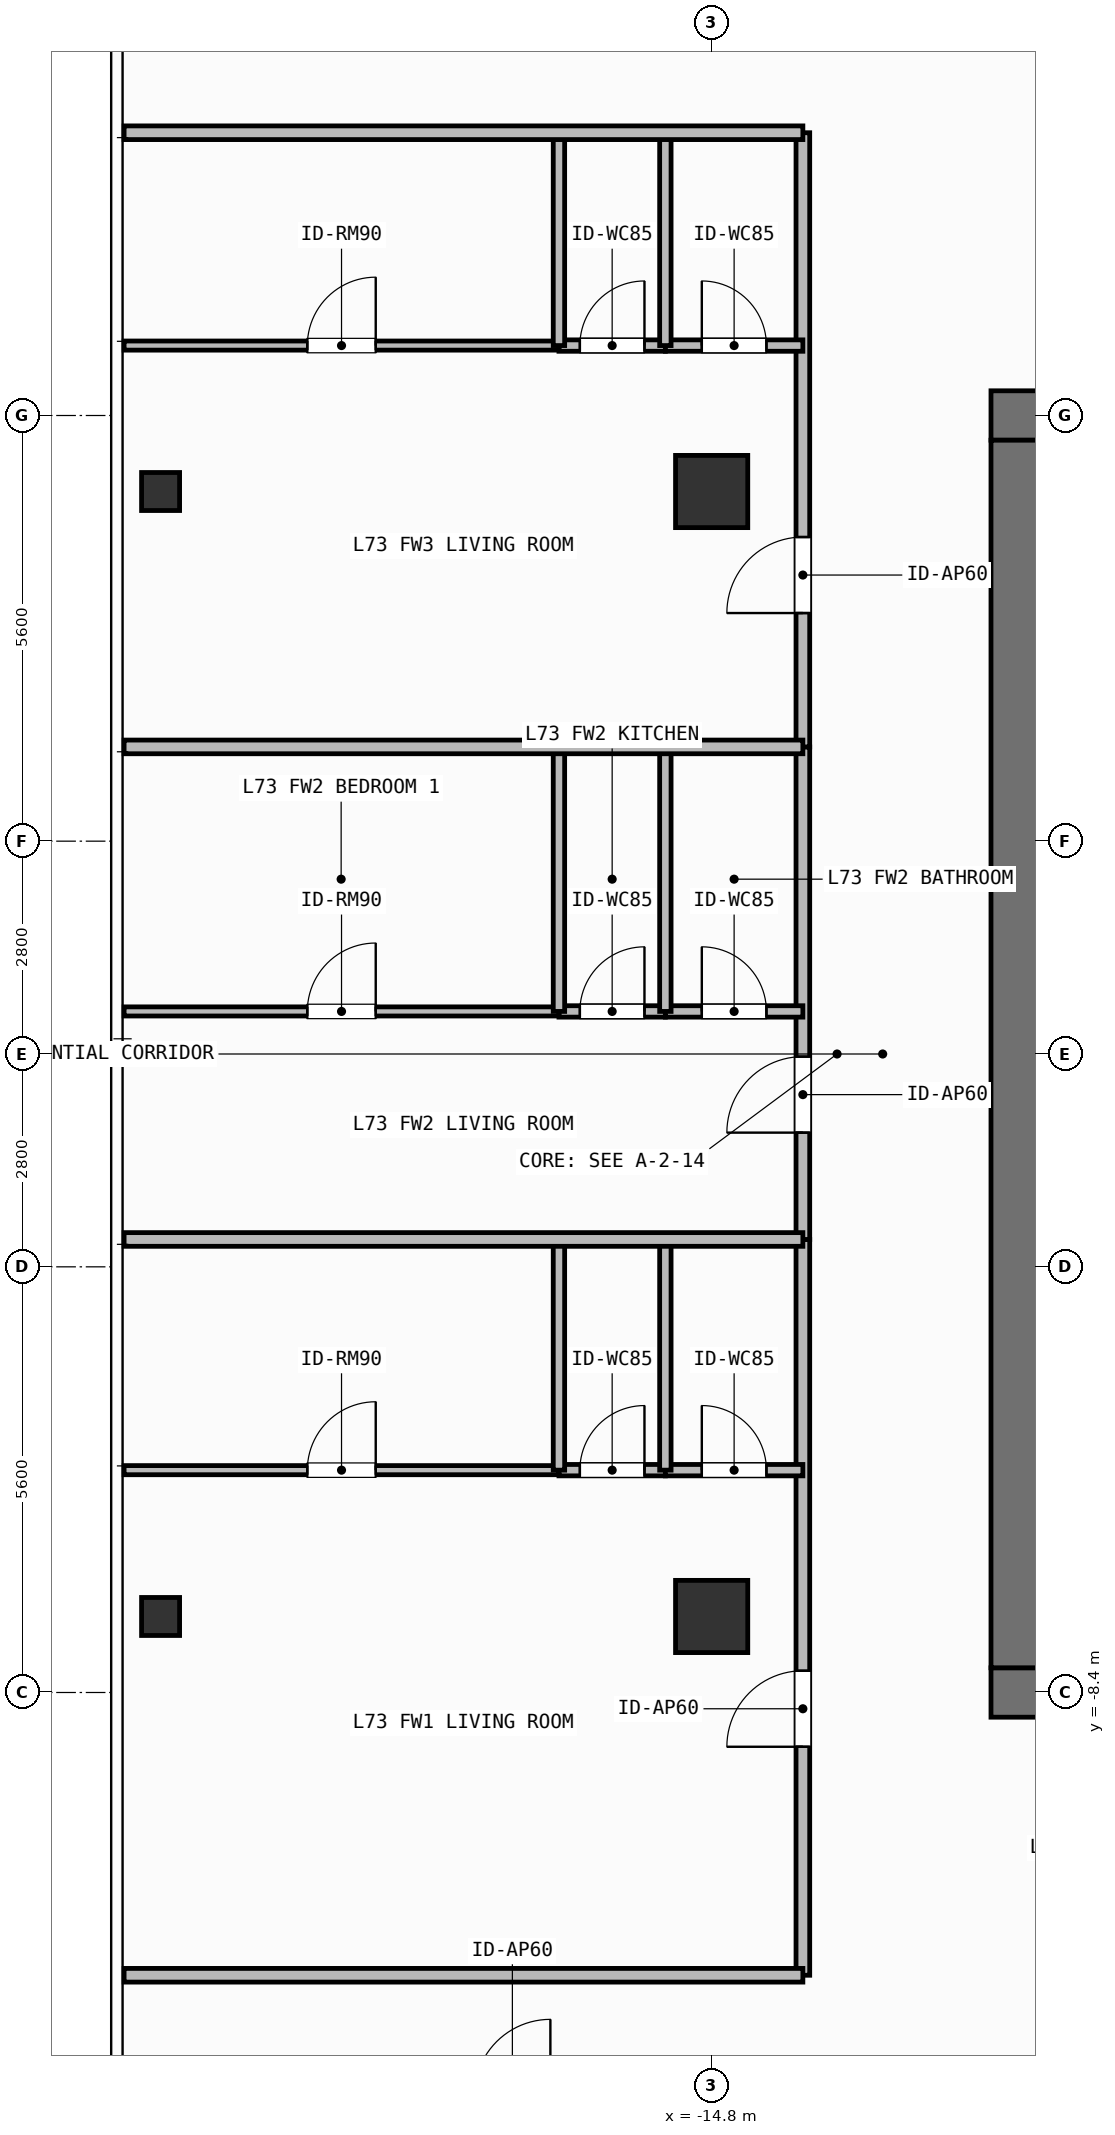
"""IFC4 building model, lengths in metres.
Left out: names, types, materials, properties, quantities, classifications, styles, units other than length and angle.
Written with IfcOpenShell. Run it as: python <this file> out.ifc"""

import sys

from ifc_helpers import new_model, si_unit, direction, frame, frame_2d, origin, origin_2d, place, context, subcontext, project, spatial, rectangle, hollow_rectangle, extrude, element, fill, save


model = new_model("IFC4")
c1 = context("Model", 3, precision=1e-05, world=origin(), true_north=direction((0.0, 1.0)))
c2 = subcontext(c1, "Body", "Model", "MODEL_VIEW")
j1 = project(units=[si_unit("LENGTHUNIT", "METRE"), si_unit("PLANEANGLEUNIT", "RADIAN")], contexts=[c1])
p1 = place(None, origin())
s1 = spatial("IfcSite", under=j1, at=p1, CompositionType="ELEMENT")
p2 = place(p1, origin())
s2 = spatial("IfcBuilding", under=s1, at=p2, CompositionType="ELEMENT")
p3 = place(p2, frame((0.0, 0.0, 297.6)))
s3 = spatial("IfcBuildingStorey", under=s2, at=p3, CompositionType="ELEMENT", Elevation=297.6)
for number, where, z_axis, x_axis in (
    (1, (-11.125, -8.4, 0.0), (0.0, 0.0, 1.0), (1.0, 0.0, 0.0)),
    (2, (-11.125, 8.4, 0.0), (0.0, 0.0, 1.0), (1.0, 0.0, 0.0)),
):
    element("IfcWall", number, at=place(p3, frame(where, z_axis=z_axis, x_axis=x_axis)), inside=s3, PredefinedType="SHEAR", context=c2, shape_type="SweptSolid", body=[
        extrude(rectangle(XDim=1.425, YDim=0.65, at=frame_2d((0.712, 0.0))), origin(), (0.0, 0.0, 1.0), 3.9),
    ])
p4 = place(p3, frame((-10.8, -8.075, 0.0), z_axis=(0.0, 0.0, 1.0), x_axis=(0.0, 1.0, 0.0)))
e3 = element("IfcWall", 3, at=p4, inside=s3, PredefinedType="SHEAR", context=c2, shape_type="SweptSolid", body=[
    extrude(rectangle(XDim=16.15, YDim=0.65, at=frame_2d((8.075, 0.0))), origin(), (0.0, 0.0, 1.0), 3.9),
])
for number, where, z_axis, x_axis in (
    (4, (-14.8, -7.4, 0.0), (0.0, 0.0, 1.0), (1.0, 0.0, 0.0)),
    (5, (-14.8, 7.4, 0.0), (0.0, 0.0, 1.0), (1.0, 0.0, 0.0)),
):
    element("IfcColumn", number, at=place(p3, frame(where, z_axis=z_axis, x_axis=x_axis)), inside=s3, PredefinedType="COLUMN", context=c2, shape_type="SweptSolid", body=[
        extrude(rectangle(XDim=0.95, YDim=0.95, at=origin_2d()), origin(), (0.0, 0.0, 1.0), 3.9),
    ])
for number, where, z_axis, x_axis in (
    (6, (-22.05, -7.4, 0.0), (0.0, 0.0, 1.0), (1.0, 0.0, 0.0)),
    (7, (-22.05, 7.4, 0.0), (0.0, 0.0, 1.0), (1.0, 0.0, 0.0)),
):
    element("IfcColumn", number, at=place(p3, frame(where, z_axis=z_axis, x_axis=x_axis)), inside=s3, PredefinedType="COLUMN", context=c2, shape_type="SweptSolid", body=[
        extrude(hollow_rectangle(XDim=0.5, YDim=0.5, WallThickness=0.025, at=origin_2d()), origin(), (0.0, 0.0, 1.0), 3.9),
    ])
p5 = place(p3, frame((-13.6, -12.12, 0.0), z_axis=(0.0, 0.0, 1.0), x_axis=(0.0, 1.0, 0.0)))
e8 = element("IfcWall", 8, at=p5, inside=s3, PredefinedType="PARTITIONING", context=c2, shape_type="SweptSolid", body=[
    extrude(rectangle(XDim=9.68, YDim=0.18, at=frame_2d((4.84, 0.0))), origin(), (0.0, 0.0, 1.0), 3.68),
])
p6 = place(p5, frame((3.006, 0.0, 0.0)))
e9 = element("IfcOpeningElement", 9, at=p6, cuts=e8, PredefinedType="OPENING", context=c2, shape_type="SweptSolid", body=[
    extrude(rectangle(XDim=1.0, YDim=2.2, at=frame_2d((0.5, 1.1))), frame((0.0, 0.1, 0.0), z_axis=(0.0, -1.0, 0.0), x_axis=(1.0, 0.0, 0.0)), (0.0, 0.0, 1.0), 0.2),
])
p7 = place(p3, frame((-16.809, -5.475, 0.0), z_axis=(0.0, 0.0, 1.0), x_axis=(1.0, 0.0, 0.0)))
e10 = element("IfcWall", 10, at=p7, inside=s3, PredefinedType="PARTITIONING", context=c2, shape_type="SweptSolid", body=[
    extrude(rectangle(XDim=1.4, YDim=0.15, at=frame_2d((0.7, 0.0))), origin(), (0.0, 0.0, 1.0), 3.68),
])
p8 = place(p7, frame((0.275, 0.0, 0.0)))
e11 = element("IfcOpeningElement", 11, at=p8, cuts=e10, PredefinedType="OPENING", context=c2, shape_type="SweptSolid", body=[
    extrude(rectangle(XDim=0.85, YDim=2.1, at=frame_2d((0.425, 1.05))), frame((0.0, 0.085, 0.0), z_axis=(0.0, -1.0, 0.0), x_axis=(1.0, 0.0, 0.0)), (0.0, 0.0, 1.0), 0.17),
])
p9 = place(p3, frame((-15.409, -5.475, 0.0), z_axis=(0.0, 0.0, 1.0), x_axis=(1.0, 0.0, 0.0)))
e12 = element("IfcWall", 12, at=p9, inside=s3, PredefinedType="PARTITIONING", context=c2, shape_type="SweptSolid", body=[
    extrude(rectangle(XDim=1.809, YDim=0.15, at=frame_2d((0.904, 0.0))), origin(), (0.0, 0.0, 1.0), 3.68),
])
p10 = place(p9, frame((0.479, 0.0, 0.0)))
e13 = element("IfcOpeningElement", 13, at=p10, cuts=e12, PredefinedType="OPENING", context=c2, shape_type="SweptSolid", body=[
    extrude(rectangle(XDim=0.85, YDim=2.1, at=frame_2d((0.425, 1.05))), frame((0.0, 0.085, 0.0), z_axis=(0.0, -1.0, 0.0), x_axis=(1.0, 0.0, 0.0)), (0.0, 0.0, 1.0), 0.17),
])
p11 = place(p3, frame((-22.53, -5.475, 0.0), z_axis=(0.0, 0.0, 1.0), x_axis=(1.0, 0.0, 0.0)))
e14 = element("IfcWall", 14, at=p11, inside=s3, PredefinedType="PARTITIONING", context=c2, shape_type="SweptSolid", body=[
    extrude(rectangle(XDim=5.721, YDim=0.12, at=frame_2d((2.86, 0.0))), origin(), (0.0, 0.0, 1.0), 3.68),
])
p12 = place(p11, frame((2.41, 0.0, 0.0)))
e15 = element("IfcOpeningElement", 15, at=p12, cuts=e14, PredefinedType="OPENING", context=c2, shape_type="SweptSolid", body=[
    extrude(rectangle(XDim=0.9, YDim=2.1, at=frame_2d((0.45, 1.05))), frame((0.0, 0.07, 0.0), z_axis=(0.0, -1.0, 0.0), x_axis=(1.0, 0.0, 0.0)), (0.0, 0.0, 1.0), 0.14),
])
p13 = place(p3, frame((-13.6, -2.44, 0.0), z_axis=(0.0, 0.0, 1.0), x_axis=(0.0, 1.0, 0.0)))
e16 = element("IfcWall", 16, at=p13, inside=s3, PredefinedType="PARTITIONING", context=c2, shape_type="SweptSolid", body=[
    extrude(rectangle(XDim=6.48, YDim=0.18, at=frame_2d((3.24, 0.0))), origin(), (0.0, 0.0, 1.0), 3.68),
])
p14 = place(p13, frame((1.406, 0.0, 0.0)))
e17 = element("IfcOpeningElement", 17, at=p14, cuts=e16, PredefinedType="OPENING", context=c2, shape_type="SweptSolid", body=[
    extrude(rectangle(XDim=1.0, YDim=2.2, at=frame_2d((0.5, 1.1))), frame((0.0, 0.1, 0.0), z_axis=(0.0, -1.0, 0.0), x_axis=(1.0, 0.0, 0.0)), (0.0, 0.0, 1.0), 0.2),
])
p15 = place(p3, frame((-16.809, 0.56, 0.0), z_axis=(0.0, 0.0, 1.0), x_axis=(1.0, 0.0, 0.0)))
e18 = element("IfcWall", 18, at=p15, inside=s3, PredefinedType="PARTITIONING", context=c2, shape_type="SweptSolid", body=[
    extrude(rectangle(XDim=1.4, YDim=0.15, at=frame_2d((0.7, 0.0))), origin(), (0.0, 0.0, 1.0), 3.68),
])
p16 = place(p15, frame((0.275, 0.0, 0.0)))
e19 = element("IfcOpeningElement", 19, at=p16, cuts=e18, PredefinedType="OPENING", context=c2, shape_type="SweptSolid", body=[
    extrude(rectangle(XDim=0.85, YDim=2.1, at=frame_2d((0.425, 1.05))), frame((0.0, 0.085, 0.0), z_axis=(0.0, -1.0, 0.0), x_axis=(1.0, 0.0, 0.0)), (0.0, 0.0, 1.0), 0.17),
])
p17 = place(p3, frame((-15.409, 0.56, 0.0), z_axis=(0.0, 0.0, 1.0), x_axis=(1.0, 0.0, 0.0)))
e20 = element("IfcWall", 20, at=p17, inside=s3, PredefinedType="PARTITIONING", context=c2, shape_type="SweptSolid", body=[
    extrude(rectangle(XDim=1.809, YDim=0.15, at=frame_2d((0.904, 0.0))), origin(), (0.0, 0.0, 1.0), 3.68),
])
p18 = place(p17, frame((0.479, 0.0, 0.0)))
e21 = element("IfcOpeningElement", 21, at=p18, cuts=e20, PredefinedType="OPENING", context=c2, shape_type="SweptSolid", body=[
    extrude(rectangle(XDim=0.85, YDim=2.1, at=frame_2d((0.425, 1.05))), frame((0.0, 0.085, 0.0), z_axis=(0.0, -1.0, 0.0), x_axis=(1.0, 0.0, 0.0)), (0.0, 0.0, 1.0), 0.17),
])
p19 = place(p3, frame((-22.53, 0.56, 0.0), z_axis=(0.0, 0.0, 1.0), x_axis=(1.0, 0.0, 0.0)))
e22 = element("IfcWall", 22, at=p19, inside=s3, PredefinedType="PARTITIONING", context=c2, shape_type="SweptSolid", body=[
    extrude(rectangle(XDim=5.721, YDim=0.12, at=frame_2d((2.86, 0.0))), origin(), (0.0, 0.0, 1.0), 3.68),
])
p20 = place(p19, frame((2.41, 0.0, 0.0)))
e23 = element("IfcOpeningElement", 23, at=p20, cuts=e22, PredefinedType="OPENING", context=c2, shape_type="SweptSolid", body=[
    extrude(rectangle(XDim=0.9, YDim=2.1, at=frame_2d((0.45, 1.05))), frame((0.0, 0.07, 0.0), z_axis=(0.0, -1.0, 0.0), x_axis=(1.0, 0.0, 0.0)), (0.0, 0.0, 1.0), 0.14),
])
p21 = place(p3, frame((-13.6, 4.04, 0.0), z_axis=(0.0, 0.0, 1.0), x_axis=(0.0, 1.0, 0.0)))
e24 = element("IfcWall", 24, at=p21, inside=s3, PredefinedType="PARTITIONING", context=c2, shape_type="SweptSolid", body=[
    extrude(rectangle(XDim=8.08, YDim=0.18, at=frame_2d((4.04, 0.0))), origin(), (0.0, 0.0, 1.0), 3.68),
])
p22 = place(p21, frame((1.761, 0.0, 0.0)))
e25 = element("IfcOpeningElement", 25, at=p22, cuts=e24, PredefinedType="OPENING", context=c2, shape_type="SweptSolid", body=[
    extrude(rectangle(XDim=1.0, YDim=2.2, at=frame_2d((0.5, 1.1))), frame((0.0, 0.1, 0.0), z_axis=(0.0, -1.0, 0.0), x_axis=(1.0, 0.0, 0.0)), (0.0, 0.0, 1.0), 0.2),
])
p23 = place(p3, frame((-16.809, 9.32, 0.0), z_axis=(0.0, 0.0, 1.0), x_axis=(1.0, 0.0, 0.0)))
e26 = element("IfcWall", 26, at=p23, inside=s3, PredefinedType="PARTITIONING", context=c2, shape_type="SweptSolid", body=[
    extrude(rectangle(XDim=1.4, YDim=0.15, at=frame_2d((0.7, 0.0))), origin(), (0.0, 0.0, 1.0), 3.68),
])
p24 = place(p23, frame((0.275, 0.0, 0.0)))
e27 = element("IfcOpeningElement", 27, at=p24, cuts=e26, PredefinedType="OPENING", context=c2, shape_type="SweptSolid", body=[
    extrude(rectangle(XDim=0.85, YDim=2.1, at=frame_2d((0.425, 1.05))), frame((0.0, 0.085, 0.0), z_axis=(0.0, -1.0, 0.0), x_axis=(1.0, 0.0, 0.0)), (0.0, 0.0, 1.0), 0.17),
])
p25 = place(p3, frame((-15.409, 9.32, 0.0), z_axis=(0.0, 0.0, 1.0), x_axis=(1.0, 0.0, 0.0)))
e28 = element("IfcWall", 28, at=p25, inside=s3, PredefinedType="PARTITIONING", context=c2, shape_type="SweptSolid", body=[
    extrude(rectangle(XDim=1.809, YDim=0.15, at=frame_2d((0.904, 0.0))), origin(), (0.0, 0.0, 1.0), 3.68),
])
p26 = place(p25, frame((0.479, 0.0, 0.0)))
e29 = element("IfcOpeningElement", 29, at=p26, cuts=e28, PredefinedType="OPENING", context=c2, shape_type="SweptSolid", body=[
    extrude(rectangle(XDim=0.85, YDim=2.1, at=frame_2d((0.425, 1.05))), frame((0.0, 0.085, 0.0), z_axis=(0.0, -1.0, 0.0), x_axis=(1.0, 0.0, 0.0)), (0.0, 0.0, 1.0), 0.17),
])
p27 = place(p3, frame((-22.53, 9.32, 0.0), z_axis=(0.0, 0.0, 1.0), x_axis=(1.0, 0.0, 0.0)))
e30 = element("IfcWall", 30, at=p27, inside=s3, PredefinedType="PARTITIONING", context=c2, shape_type="SweptSolid", body=[
    extrude(rectangle(XDim=5.721, YDim=0.12, at=frame_2d((2.86, 0.0))), origin(), (0.0, 0.0, 1.0), 3.68),
])
p28 = place(p27, frame((2.41, 0.0, 0.0)))
e31 = element("IfcOpeningElement", 31, at=p28, cuts=e30, PredefinedType="OPENING", context=c2, shape_type="SweptSolid", body=[
    extrude(rectangle(XDim=0.9, YDim=2.1, at=frame_2d((0.45, 1.05))), frame((0.0, 0.07, 0.0), z_axis=(0.0, -1.0, 0.0), x_axis=(1.0, 0.0, 0.0)), (0.0, 0.0, 1.0), 0.14),
])
for number, where, z_axis, x_axis in (
    (32, (-15.409, -5.475, 0.0), (0.0, 0.0, 1.0), (0.0, 1.0, 0.0)),
    (33, (-16.809, -5.475, 0.0), (0.0, 0.0, 1.0), (0.0, 1.0, 0.0)),
):
    element("IfcWall", number, at=place(p3, frame(where, z_axis=z_axis, x_axis=x_axis)), inside=s3, PredefinedType="PARTITIONING", context=c2, shape_type="SweptSolid", body=[
        extrude(rectangle(XDim=3.035, YDim=0.15, at=frame_2d((1.518, 0.0))), origin(), (0.0, 0.0, 1.0), 3.68),
    ])
for number, where, z_axis, x_axis in (
    (34, (-15.409, 0.56, 0.0), (0.0, 0.0, 1.0), (0.0, 1.0, 0.0)),
    (35, (-16.809, 0.56, 0.0), (0.0, 0.0, 1.0), (0.0, 1.0, 0.0)),
):
    element("IfcWall", number, at=place(p3, frame(where, z_axis=z_axis, x_axis=x_axis)), inside=s3, PredefinedType="PARTITIONING", context=c2, shape_type="SweptSolid", body=[
        extrude(rectangle(XDim=3.48, YDim=0.15, at=frame_2d((1.74, 0.0))), origin(), (0.0, 0.0, 1.0), 3.68),
    ])
p29 = place(p3, frame((-22.53, -2.44, 0.0), z_axis=(0.0, 0.0, 1.0), x_axis=(1.0, 0.0, 0.0)))
e36 = element("IfcWall", 36, at=p29, inside=s3, PredefinedType="PARTITIONING", context=c2, shape_type="SweptSolid", body=[
    extrude(rectangle(XDim=8.93, YDim=0.18, at=frame_2d((4.465, 0.0))), origin(), (0.0, 0.0, 1.0), 3.68),
])
for number, where, z_axis, x_axis in (
    (37, (-15.409, 9.32, 0.0), (0.0, 0.0, 1.0), (0.0, 1.0, 0.0)),
    (38, (-16.809, 9.32, 0.0), (0.0, 0.0, 1.0), (0.0, 1.0, 0.0)),
):
    element("IfcWall", number, at=place(p3, frame(where, z_axis=z_axis, x_axis=x_axis)), inside=s3, PredefinedType="PARTITIONING", context=c2, shape_type="SweptSolid", body=[
        extrude(rectangle(XDim=2.8, YDim=0.15, at=frame_2d((1.4, 0.0))), origin(), (0.0, 0.0, 1.0), 3.68),
    ])
for number, where, z_axis, x_axis in (
    (39, (-22.53, 4.04, 0.0), (0.0, 0.0, 1.0), (1.0, 0.0, 0.0)),
    (40, (-22.53, -12.12, 0.0), (0.0, 0.0, 1.0), (1.0, 0.0, 0.0)),
    (41, (-22.53, 12.12, 0.0), (0.0, 0.0, 1.0), (1.0, 0.0, 0.0)),
):
    element("IfcWall", number, at=place(p3, frame(where, z_axis=z_axis, x_axis=x_axis)), inside=s3, PredefinedType="PARTITIONING", context=c2, shape_type="SweptSolid", body=[
        extrude(rectangle(XDim=8.93, YDim=0.18, at=frame_2d((4.465, 0.0))), origin(), (0.0, 0.0, 1.0), 3.68),
    ])
p30 = place(p6, origin())
e42 = element("IfcDoor", 42, at=p30, inside=s3, OperationType="SINGLE_SWING_LEFT", PredefinedType="DOOR", context=c2, shape_type="SweptSolid", body=[
    extrude(rectangle(XDim=1.0, YDim=2.2, at=frame_2d((0.5, 1.1))), frame((0.0, 0.025, 0.0), z_axis=(0.0, -1.0, 0.0), x_axis=(1.0, 0.0, 0.0)), (0.0, 0.0, 1.0), 0.05),
])
fill(e9, e42)
p31 = place(p8, origin())
e43 = element("IfcDoor", 43, at=p31, inside=s3, OperationType="SINGLE_SWING_RIGHT", PredefinedType="DOOR", context=c2, shape_type="SweptSolid", body=[
    extrude(rectangle(XDim=0.85, YDim=2.1, at=frame_2d((0.425, 1.05))), frame((0.0, 0.025, 0.0), z_axis=(0.0, -1.0, 0.0), x_axis=(1.0, 0.0, 0.0)), (0.0, 0.0, 1.0), 0.05),
])
fill(e11, e43)
p32 = place(p10, origin())
e44 = element("IfcDoor", 44, at=p32, inside=s3, OperationType="SINGLE_SWING_LEFT", PredefinedType="DOOR", context=c2, shape_type="SweptSolid", body=[
    extrude(rectangle(XDim=0.85, YDim=2.1, at=frame_2d((0.425, 1.05))), frame((0.0, 0.025, 0.0), z_axis=(0.0, -1.0, 0.0), x_axis=(1.0, 0.0, 0.0)), (0.0, 0.0, 1.0), 0.05),
])
fill(e13, e44)
p33 = place(p12, origin())
e45 = element("IfcDoor", 45, at=p33, inside=s3, OperationType="SINGLE_SWING_RIGHT", PredefinedType="DOOR", context=c2, shape_type="SweptSolid", body=[
    extrude(rectangle(XDim=0.9, YDim=2.1, at=frame_2d((0.45, 1.05))), frame((0.0, 0.025, 0.0), z_axis=(0.0, -1.0, 0.0), x_axis=(1.0, 0.0, 0.0)), (0.0, 0.0, 1.0), 0.05),
])
fill(e15, e45)
p34 = place(p14, origin())
e46 = element("IfcDoor", 46, at=p34, inside=s3, OperationType="SINGLE_SWING_LEFT", PredefinedType="DOOR", context=c2, shape_type="SweptSolid", body=[
    extrude(rectangle(XDim=1.0, YDim=2.2, at=frame_2d((0.5, 1.1))), frame((0.0, 0.025, 0.0), z_axis=(0.0, -1.0, 0.0), x_axis=(1.0, 0.0, 0.0)), (0.0, 0.0, 1.0), 0.05),
])
fill(e17, e46)
p35 = place(p16, origin())
e47 = element("IfcDoor", 47, at=p35, inside=s3, OperationType="SINGLE_SWING_RIGHT", PredefinedType="DOOR", context=c2, shape_type="SweptSolid", body=[
    extrude(rectangle(XDim=0.85, YDim=2.1, at=frame_2d((0.425, 1.05))), frame((0.0, 0.025, 0.0), z_axis=(0.0, -1.0, 0.0), x_axis=(1.0, 0.0, 0.0)), (0.0, 0.0, 1.0), 0.05),
])
fill(e19, e47)
p36 = place(p18, origin())
e48 = element("IfcDoor", 48, at=p36, inside=s3, OperationType="SINGLE_SWING_LEFT", PredefinedType="DOOR", context=c2, shape_type="SweptSolid", body=[
    extrude(rectangle(XDim=0.85, YDim=2.1, at=frame_2d((0.425, 1.05))), frame((0.0, 0.025, 0.0), z_axis=(0.0, -1.0, 0.0), x_axis=(1.0, 0.0, 0.0)), (0.0, 0.0, 1.0), 0.05),
])
fill(e21, e48)
p37 = place(p20, origin())
e49 = element("IfcDoor", 49, at=p37, inside=s3, OperationType="SINGLE_SWING_RIGHT", PredefinedType="DOOR", context=c2, shape_type="SweptSolid", body=[
    extrude(rectangle(XDim=0.9, YDim=2.1, at=frame_2d((0.45, 1.05))), frame((0.0, 0.025, 0.0), z_axis=(0.0, -1.0, 0.0), x_axis=(1.0, 0.0, 0.0)), (0.0, 0.0, 1.0), 0.05),
])
fill(e23, e49)
p38 = place(p22, origin())
e50 = element("IfcDoor", 50, at=p38, inside=s3, OperationType="SINGLE_SWING_LEFT", PredefinedType="DOOR", context=c2, shape_type="SweptSolid", body=[
    extrude(rectangle(XDim=1.0, YDim=2.2, at=frame_2d((0.5, 1.1))), frame((0.0, 0.025, 0.0), z_axis=(0.0, -1.0, 0.0), x_axis=(1.0, 0.0, 0.0)), (0.0, 0.0, 1.0), 0.05),
])
fill(e25, e50)
p39 = place(p24, origin())
e51 = element("IfcDoor", 51, at=p39, inside=s3, OperationType="SINGLE_SWING_RIGHT", PredefinedType="DOOR", context=c2, shape_type="SweptSolid", body=[
    extrude(rectangle(XDim=0.85, YDim=2.1, at=frame_2d((0.425, 1.05))), frame((0.0, 0.025, 0.0), z_axis=(0.0, -1.0, 0.0), x_axis=(1.0, 0.0, 0.0)), (0.0, 0.0, 1.0), 0.05),
])
fill(e27, e51)
p40 = place(p26, origin())
e52 = element("IfcDoor", 52, at=p40, inside=s3, OperationType="SINGLE_SWING_LEFT", PredefinedType="DOOR", context=c2, shape_type="SweptSolid", body=[
    extrude(rectangle(XDim=0.85, YDim=2.1, at=frame_2d((0.425, 1.05))), frame((0.0, 0.025, 0.0), z_axis=(0.0, -1.0, 0.0), x_axis=(1.0, 0.0, 0.0)), (0.0, 0.0, 1.0), 0.05),
])
fill(e29, e52)
p41 = place(p28, origin())
e53 = element("IfcDoor", 53, at=p41, inside=s3, OperationType="SINGLE_SWING_RIGHT", PredefinedType="DOOR", context=c2, shape_type="SweptSolid", body=[
    extrude(rectangle(XDim=0.9, YDim=2.1, at=frame_2d((0.45, 1.05))), frame((0.0, 0.025, 0.0), z_axis=(0.0, -1.0, 0.0), x_axis=(1.0, 0.0, 0.0)), (0.0, 0.0, 1.0), 0.05),
])
fill(e31, e53)
save(model, sys.argv[1])
